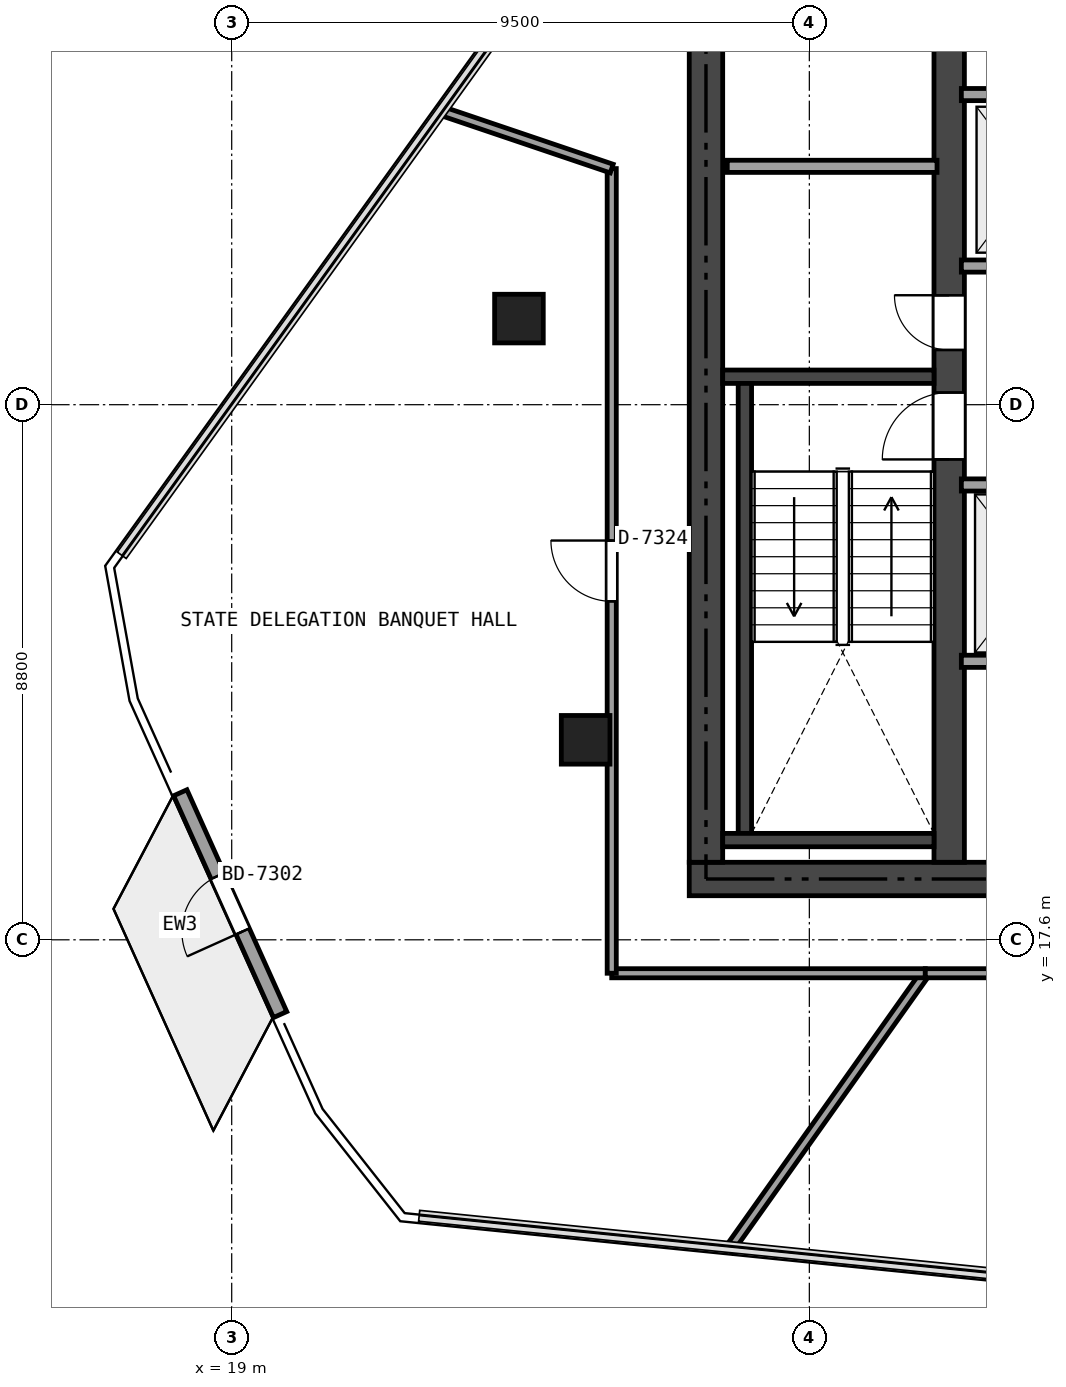
"""IFC4 building model, lengths in metres.
Left out: names, types, materials, properties, quantities, classifications, styles, units other than length and angle.
Written with IfcOpenShell. Run it as: python <this file> out.ifc"""

import sys

from ifc_helpers import new_model, si_unit, direction, frame, frame_2d, origin, origin_2d, place, context, subcontext, project, spatial, rectangle, extrude, element, fill, save


model = new_model("IFC4")
c1 = context("Model", 3, precision=1e-05, world=origin(), true_north=direction((0.0, 1.0)))
c2 = subcontext(c1, "Body", "Model", "MODEL_VIEW")
j1 = project(units=[si_unit("LENGTHUNIT", "METRE"), si_unit("PLANEANGLEUNIT", "RADIAN")], contexts=[c1])
p1 = place(None, origin())
s1 = spatial("IfcSite", under=j1, at=p1, CompositionType="ELEMENT")
p2 = place(p1, origin())
s2 = spatial("IfcBuilding", under=s1, at=p2, CompositionType="ELEMENT")
p3 = place(p2, frame((0.0, 0.0, 271.5)))
s3 = spatial("IfcBuildingStorey", under=s2, at=p3, CompositionType="ELEMENT", Elevation=271.5)
p4 = place(p3, frame((26.525, 18.6, 0.0), z_axis=(0.0, 0.0, 1.0), x_axis=(1.0, 0.0, 0.0)))
e1 = element("IfcWall", 1, at=p4, inside=s3, PredefinedType="SHEAR", context=c2, shape_type="SweptSolid", body=[
    extrude(rectangle(XDim=21.35, YDim=0.55, at=frame_2d((10.675, 0.0))), origin(), (0.0, 0.0, 1.0), 3.32),
])
p5 = place(p4, frame((12.4, 0.0, 0.0)))
e2 = element("IfcOpeningElement", 2, at=p5, cuts=e1, PredefinedType="OPENING", context=c2, shape_type="SweptSolid", body=[
    extrude(rectangle(XDim=1.15, YDim=2.15, at=frame_2d((0.575, 1.075))), frame((0.0, 0.285, 0.0), z_axis=(0.0, -1.0, 0.0), x_axis=(1.0, 0.0, 0.0)), (0.0, 0.0, 1.0), 0.57),
])
p6 = place(p4, frame((5.225, 0.0, 0.0)))
e3 = element("IfcOpeningElement", 3, at=p6, cuts=e1, PredefinedType="OPENING", context=c2, shape_type="SweptSolid", body=[
    extrude(rectangle(XDim=0.9, YDim=2.1, at=frame_2d((0.45, 1.05))), frame((0.0, 0.285, 0.0), z_axis=(0.0, -1.0, 0.0), x_axis=(1.0, 0.0, 0.0)), (0.0, 0.0, 1.0), 0.57),
])
p7 = place(p3, frame((26.8, 18.875, 0.0), z_axis=(0.0, 0.0, 1.0), x_axis=(0.0, 1.0, 0.0)))
e4 = element("IfcWall", 4, at=p7, inside=s3, PredefinedType="SHEAR", context=c2, shape_type="SweptSolid", body=[
    extrude(rectangle(XDim=15.05, YDim=0.55, at=frame_2d((7.525, 0.0))), origin(), (0.0, 0.0, 1.0), 3.32),
])
p8 = place(p3, frame((30.8, 18.875, 0.0), z_axis=(0.0, 0.0, 1.0), x_axis=(0.0, 1.0, 0.0)))
e5 = element("IfcWall", 5, at=p8, inside=s3, PredefinedType="SHEAR", context=c2, shape_type="SweptSolid", body=[
    extrude(rectangle(XDim=15.05, YDim=0.5, at=frame_2d((7.525, 0.0))), origin(), (0.0, 0.0, 1.0), 3.32),
])
p9 = place(p8, frame((6.625, 0.0, 0.0)))
e6 = element("IfcOpeningElement", 6, at=p9, cuts=e5, PredefinedType="OPENING", context=c2, shape_type="SweptSolid", body=[
    extrude(rectangle(XDim=1.1, YDim=2.15, at=frame_2d((0.55, 1.075))), frame((0.0, 0.26, 0.0), z_axis=(0.0, -1.0, 0.0), x_axis=(1.0, 0.0, 0.0)), (0.0, 0.0, 1.0), 0.52),
])
p10 = place(p8, frame((8.425, 0.0, 0.0)))
e7 = element("IfcOpeningElement", 7, at=p10, cuts=e5, PredefinedType="OPENING", context=c2, shape_type="SweptSolid", body=[
    extrude(rectangle(XDim=0.9, YDim=2.1, at=frame_2d((0.45, 1.05))), frame((0.0, 0.26, 0.0), z_axis=(0.0, -1.0, 0.0), x_axis=(1.0, 0.0, 0.0)), (0.0, 0.0, 1.0), 0.52),
])
p11 = place(p3, frame((27.075, 26.86, 0.0), z_axis=(0.0, 0.0, 1.0), x_axis=(1.0, 0.0, 0.0)))
e8 = element("IfcWall", 8, at=p11, inside=s3, PredefinedType="SHEAR", context=c2, shape_type="SweptSolid", body=[
    extrude(rectangle(XDim=3.475, YDim=0.22, at=frame_2d((1.738, 0.0))), origin(), (0.0, 0.0, 1.0), 3.32),
])
p12 = place(p3, frame((27.44, 19.35, 0.0), z_axis=(0.0, 0.0, 1.0), x_axis=(0.0, 1.0, 0.0)))
e9 = element("IfcWall", 9, at=p12, inside=s3, PredefinedType="SHEAR", context=c2, shape_type="SweptSolid", body=[
    extrude(rectangle(XDim=7.4, YDim=0.22, at=frame_2d((3.7, 0.0))), origin(), (0.0, 0.0, 1.0), 3.32),
])
p13 = place(p3, frame((27.075, 19.24, 0.0), z_axis=(0.0, 0.0, 1.0), x_axis=(1.0, 0.0, 0.0)))
e10 = element("IfcWall", 10, at=p13, inside=s3, PredefinedType="SHEAR", context=c2, shape_type="SweptSolid", body=[
    extrude(rectangle(XDim=3.475, YDim=0.22, at=frame_2d((1.738, 0.0))), origin(), (0.0, 0.0, 1.0), 3.32),
])
for number, where, z_axis, x_axis in (
    (11, (23.724, 27.816, 0.0), (0.0, 0.0, 1.0), (1.0, 0.0, 0.0)),
    (12, (24.821, 20.889, 0.0), (0.0, 0.0, 1.0), (1.0, 0.0, 0.0)),
):
    element("IfcColumn", number, at=place(p3, frame(where, z_axis=z_axis, x_axis=x_axis)), inside=s3, PredefinedType="COLUMN", context=c2, shape_type="SweptSolid", body=[
        extrude(rectangle(XDim=0.8, YDim=0.8, at=origin_2d()), origin(), (0.0, 0.0, 1.0), 3.32),
    ])
p14 = place(p3, frame((19.796, 16.37, 0.0), z_axis=(0.0, 0.0, 1.0), x_axis=(-0.410420503569, 0.911896381312, 0.0)))
e13 = element("IfcWall", 13, at=p14, inside=s3, PredefinedType="SOLIDWALL", context=c2, shape_type="SweptSolid", body=[
    extrude(rectangle(XDim=4.0, YDim=0.24, at=frame_2d((2.0, 0.0))), origin(), (0.0, 0.0, 1.0), 3.32),
])
p15 = place(p14, frame((1.5, 0.0, 0.0)))
e14 = element("IfcOpeningElement", 14, at=p15, cuts=e13, PredefinedType="OPENING", context=c2, shape_type="SweptSolid", body=[
    extrude(rectangle(XDim=1.0, YDim=2.15, at=frame_2d((0.5, 1.075))), frame((0.0, 0.13, 0.0), z_axis=(0.0, -1.0, 0.0), x_axis=(1.0, 0.0, 0.0)), (0.0, 0.0, 1.0), 0.26),
])
p16 = place(p3, frame((27.15, 30.32, 0.0), z_axis=(0.0, 0.0, 1.0), x_axis=(1.0, 0.0, 0.0)))
e15 = element("IfcWall", 15, at=p16, inside=s3, PredefinedType="SOLIDWALL", context=c2, shape_type="SweptSolid", body=[
    extrude(rectangle(XDim=3.45, YDim=0.2, at=frame_2d((1.725, 0.0))), origin(), (0.0, 0.0, 1.0), 2.993),
])
p17 = place(p3, frame((31.0, 28.68, 0.0), z_axis=(0.0, 0.0, 1.0), x_axis=(1.0, 0.0, 0.0)))
e16 = element("IfcWall", 16, at=p17, inside=s3, PredefinedType="SOLIDWALL", context=c2, shape_type="SweptSolid", body=[
    extrude(rectangle(XDim=4.42, YDim=0.2, at=frame_2d((2.21, 0.0))), origin(), (0.0, 0.0, 1.0), 3.32),
])
p18 = place(p17, frame((0.6, 0.0, 0.0)))
e17 = element("IfcOpeningElement", 17, at=p18, cuts=e16, PredefinedType="OPENING", context=c2, shape_type="SweptSolid", body=[
    extrude(rectangle(XDim=1.1, YDim=2.15, at=frame_2d((0.55, 1.075))), frame((0.0, 0.11, 0.0), z_axis=(0.0, -1.0, 0.0), x_axis=(1.0, 0.0, 0.0)), (0.0, 0.0, 1.0), 0.22),
])
p19 = place(p17, frame((2.85, 0.0, 0.0)))
e18 = element("IfcOpeningElement", 18, at=p19, cuts=e16, PredefinedType="OPENING", context=c2, shape_type="SweptSolid", body=[
    extrude(rectangle(XDim=1.1, YDim=2.15, at=frame_2d((0.55, 1.075))), frame((0.0, 0.11, 0.0), z_axis=(0.0, -1.0, 0.0), x_axis=(1.0, 0.0, 0.0)), (0.0, 0.0, 1.0), 0.22),
])
p20 = place(p3, frame((31.0, 31.5, 0.0), z_axis=(0.0, 0.0, 1.0), x_axis=(1.0, 0.0, 0.0)))
e19 = element("IfcWall", 19, at=p20, inside=s3, PredefinedType="SOLIDWALL", context=c2, shape_type="SweptSolid", body=[
    extrude(rectangle(XDim=4.42, YDim=0.2, at=frame_2d((2.21, 0.0))), origin(), (0.0, 0.0, 1.0), 3.32),
])
p21 = place(p3, frame((31.0, 25.08, 0.0), z_axis=(0.0, 0.0, 1.0), x_axis=(1.0, 0.0, 0.0)))
e20 = element("IfcWall", 20, at=p21, inside=s3, PredefinedType="SOLIDWALL", context=c2, shape_type="SweptSolid", body=[
    extrude(rectangle(XDim=4.42, YDim=0.2, at=frame_2d((2.21, 0.0))), origin(), (0.0, 0.0, 1.0), 3.32),
])
p22 = place(p21, frame((3.0, 0.0, 0.0)))
e21 = element("IfcOpeningElement", 21, at=p22, cuts=e20, PredefinedType="OPENING", context=c2, shape_type="SweptSolid", body=[
    extrude(rectangle(XDim=0.9, YDim=2.1, at=frame_2d((0.45, 1.05))), frame((0.0, 0.11, 0.0), z_axis=(0.0, -1.0, 0.0), x_axis=(1.0, 0.0, 0.0)), (0.0, 0.0, 1.0), 0.22),
])
p23 = place(p21, frame((0.62, 0.0, 0.0)))
e22 = element("IfcOpeningElement", 22, at=p23, cuts=e20, PredefinedType="OPENING", context=c2, shape_type="SweptSolid", body=[
    extrude(rectangle(XDim=1.2, YDim=2.15, at=frame_2d((0.6, 1.075))), frame((0.0, 0.11, 0.0), z_axis=(0.0, -1.0, 0.0), x_axis=(1.0, 0.0, 0.0)), (0.0, 0.0, 1.0), 0.22),
])
p24 = place(p3, frame((31.0, 22.18, 0.0), z_axis=(0.0, 0.0, 1.0), x_axis=(1.0, 0.0, 0.0)))
e23 = element("IfcWall", 23, at=p24, inside=s3, PredefinedType="SOLIDWALL", context=c2, shape_type="SweptSolid", body=[
    extrude(rectangle(XDim=2.42, YDim=0.2, at=frame_2d((1.21, 0.0))), origin(), (0.0, 0.0, 1.0), 3.32),
])
p25 = place(p3, frame((27.173, 12.497, 0.0), z_axis=(0.0, 0.0, 1.0), x_axis=(0.579073338368, 0.815275455777, 0.0)))
e24 = element("IfcWall", 24, at=p25, inside=s3, PredefinedType="PARTITIONING", context=c2, shape_type="SweptSolid", body=[
    extrude(rectangle(XDim=5.584, YDim=0.15, at=frame_2d((2.792, 0.0))), origin(), (0.0, 0.0, 1.0), 2.845),
])
p26 = place(p3, frame((30.407, 17.05, 0.0), z_axis=(0.0, 0.0, 1.0), x_axis=(-1.0, 0.0, 0.0)))
e25 = element("IfcWall", 25, at=p26, inside=s3, PredefinedType="PARTITIONING", context=c2, shape_type="SweptSolid", body=[
    extrude(rectangle(XDim=5.157, YDim=0.15, at=frame_2d((2.579, 0.0))), origin(), (0.0, 0.0, 1.0), 2.845),
])
p27 = place(p3, frame((25.25, 17.05, 0.0), z_axis=(0.0, 0.0, 1.0), x_axis=(0.0, 1.0, 0.0)))
e26 = element("IfcWall", 26, at=p27, inside=s3, PredefinedType="PARTITIONING", context=c2, shape_type="SweptSolid", body=[
    extrude(rectangle(XDim=13.233, YDim=0.15, at=frame_2d((6.616, 0.0))), origin(), (0.0, 0.0, 1.0), 2.769),
])
p28 = place(p27, frame((6.116, 0.0, 0.0)))
e27 = element("IfcOpeningElement", 27, at=p28, cuts=e26, PredefinedType="OPENING", context=c2, shape_type="SweptSolid", body=[
    extrude(rectangle(XDim=1.0, YDim=2.15, at=frame_2d((0.5, 1.075))), frame((0.0, 0.085, 0.0), z_axis=(0.0, -1.0, 0.0), x_axis=(1.0, 0.0, 0.0)), (0.0, 0.0, 1.0), 0.17),
])
p29 = place(p3, frame((25.25, 30.283, 0.0), z_axis=(0.0, 0.0, 1.0), x_axis=(-0.947248680981, 0.320499510732, 0.0)))
e28 = element("IfcWall", 28, at=p29, inside=s3, PredefinedType="PARTITIONING", context=c2, shape_type="SweptSolid", body=[
    extrude(rectangle(XDim=2.998, YDim=0.15, at=frame_2d((1.499, 0.0))), origin(), (0.0, 0.0, 1.0), 2.845),
])
p30 = place(p3, frame((43.993, 17.05, 0.0), z_axis=(0.0, 0.0, 1.0), x_axis=(-1.0, 0.0, 0.0)))
e29 = element("IfcWall", 29, at=p30, inside=s3, PredefinedType="PARTITIONING", context=c2, shape_type="SweptSolid", body=[
    extrude(rectangle(XDim=13.586, YDim=0.15, at=frame_2d((6.793, 0.0))), origin(), (0.0, 0.0, 1.0), 2.769),
])
p31 = place(p30, frame((6.293, 0.0, 0.0)))
e30 = element("IfcOpeningElement", 30, at=p31, cuts=e29, PredefinedType="OPENING", context=c2, shape_type="SweptSolid", body=[
    extrude(rectangle(XDim=1.0, YDim=2.15, at=frame_2d((0.5, 1.075))), frame((0.0, 0.085, 0.0), z_axis=(0.0, -1.0, 0.0), x_axis=(1.0, 0.0, 0.0)), (0.0, 0.0, 1.0), 0.17),
])
p32 = place(p15, origin())
e31 = element("IfcDoor", 31, at=p32, inside=s3, OperationType="SINGLE_SWING_LEFT", PredefinedType="DOOR", context=c2, shape_type="SweptSolid", body=[
    extrude(rectangle(XDim=1.0, YDim=2.15, at=frame_2d((0.5, 1.075))), frame((0.0, 0.025, 0.0), z_axis=(0.0, -1.0, 0.0), x_axis=(1.0, 0.0, 0.0)), (0.0, 0.0, 1.0), 0.05),
])
fill(e14, e31)
p33 = place(p9, origin())
e32 = element("IfcDoor", 32, at=p33, inside=s3, OperationType="SINGLE_SWING_LEFT", PredefinedType="DOOR", context=c2, shape_type="SweptSolid", body=[
    extrude(rectangle(XDim=1.1, YDim=2.15, at=frame_2d((0.55, 1.075))), frame((0.0, 0.025, 0.0), z_axis=(0.0, -1.0, 0.0), x_axis=(1.0, 0.0, 0.0)), (0.0, 0.0, 1.0), 0.05),
])
fill(e6, e32)
p34 = place(p10, origin())
e33 = element("IfcDoor", 33, at=p34, inside=s3, OperationType="SINGLE_SWING_RIGHT", PredefinedType="DOOR", context=c2, shape_type="SweptSolid", body=[
    extrude(rectangle(XDim=0.9, YDim=2.1, at=frame_2d((0.45, 1.05))), frame((0.0, 0.025, 0.0), z_axis=(0.0, -1.0, 0.0), x_axis=(1.0, 0.0, 0.0)), (0.0, 0.0, 1.0), 0.05),
])
fill(e7, e33)
p35 = place(p28, origin())
e34 = element("IfcDoor", 34, at=p35, inside=s3, OperationType="SINGLE_SWING_RIGHT", PredefinedType="DOOR", context=c2, shape_type="SweptSolid", body=[
    extrude(rectangle(XDim=1.0, YDim=2.15, at=frame_2d((0.5, 1.075))), frame((0.0, 0.025, 0.0), z_axis=(0.0, -1.0, 0.0), x_axis=(1.0, 0.0, 0.0)), (0.0, 0.0, 1.0), 0.05),
])
fill(e27, e34)
save(model, sys.argv[1])
